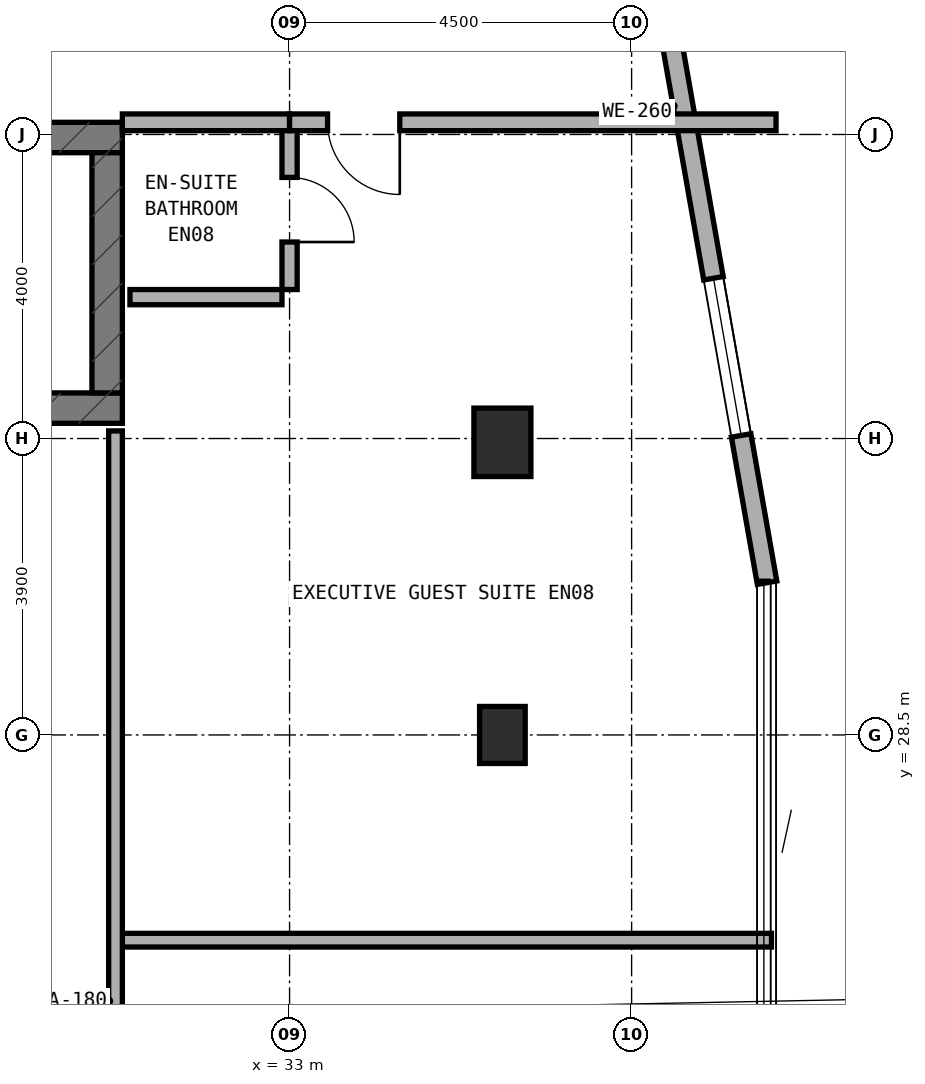
"""IFC4 building model, lengths in metres.
Left out: names, types, materials, properties, quantities, classifications, styles, units other than length and angle.
Written with IfcOpenShell. Run it as: python <this file> out.ifc"""

import sys

from ifc_helpers import new_model, si_unit, direction, frame, frame_2d, origin, origin_2d, place, context, subcontext, project, spatial, rectangle, extrude, element, fill, save


model = new_model("IFC4")
c1 = context("Model", 3, precision=1e-05, world=origin(), true_north=direction((0.0, 1.0)))
c2 = subcontext(c1, "Body", "Model", "MODEL_VIEW")
j1 = project(units=[si_unit("LENGTHUNIT", "METRE"), si_unit("PLANEANGLEUNIT", "RADIAN")], contexts=[c1])
p1 = place(None, origin())
s1 = spatial("IfcSite", under=j1, at=p1, CompositionType="ELEMENT")
p2 = place(p1, origin())
s2 = spatial("IfcBuilding", under=s1, at=p2, CompositionType="ELEMENT")
p3 = place(p2, frame((0.0, 0.0, 243.2)))
s3 = spatial("IfcBuildingStorey", under=s2, at=p3, CompositionType="ELEMENT", Elevation=243.2)
p4 = place(p3, frame((6.4, 32.8, 0.0), z_axis=(0.0, 0.0, 1.0), x_axis=(1.0, 0.0, 0.0)))
e1 = element("IfcWall", 1, at=p4, inside=s3, PredefinedType="SHEAR", context=c2, shape_type="SweptSolid", body=[
    extrude(rectangle(XDim=24.4, YDim=0.4, at=frame_2d((12.2, 0.0))), origin(), (0.0, 0.0, 1.0), 3.6),
])
p5 = place(p4, frame((6.05, 0.0, 0.0)))
e2 = element("IfcOpeningElement", 2, at=p5, cuts=e1, PredefinedType="OPENING", context=c2, shape_type="SweptSolid", body=[
    extrude(rectangle(XDim=1.1, YDim=2.15, at=frame_2d((0.55, 1.075))), frame((0.0, 0.21, 0.0), z_axis=(0.0, -1.0, 0.0), x_axis=(1.0, 0.0, 0.0)), (0.0, 0.0, 1.0), 0.42),
])
p6 = place(p3, frame((6.4, 36.36, 0.0), z_axis=(0.0, 0.0, 1.0), x_axis=(1.0, 0.0, 0.0)))
e3 = element("IfcWall", 3, at=p6, inside=s3, PredefinedType="SHEAR", context=c2, shape_type="SweptSolid", body=[
    extrude(rectangle(XDim=24.4, YDim=0.4, at=frame_2d((12.2, 0.0))), origin(), (0.0, 0.0, 1.0), 3.6),
])
p7 = place(p6, frame((9.15, 0.0, 0.0)))
e4 = element("IfcOpeningElement", 4, at=p7, cuts=e3, PredefinedType="OPENING", context=c2, shape_type="SweptSolid", body=[
    extrude(rectangle(XDim=1.2, YDim=2.15, at=frame_2d((0.6, 1.075))), frame((0.0, 0.21, 0.0), z_axis=(0.0, -1.0, 0.0), x_axis=(1.0, 0.0, 0.0)), (0.0, 0.0, 1.0), 0.42),
])
p8 = place(p6, frame((19.2, 0.0, 0.0)))
e5 = element("IfcOpeningElement", 5, at=p8, cuts=e3, PredefinedType="OPENING", context=c2, shape_type="SweptSolid", body=[
    extrude(rectangle(XDim=0.85, YDim=2.1, at=frame_2d((0.425, 1.05))), frame((0.0, 0.21, 0.0), z_axis=(0.0, -1.0, 0.0), x_axis=(1.0, 0.0, 0.0)), (0.0, 0.0, 1.0), 0.42),
])
p9 = place(p6, frame((16.94, 0.0, 0.0)))
e6 = element("IfcOpeningElement", 6, at=p9, cuts=e3, PredefinedType="OPENING", context=c2, shape_type="SweptSolid", body=[
    extrude(rectangle(XDim=0.85, YDim=2.1, at=frame_2d((0.425, 1.05))), frame((0.0, 0.21, 0.0), z_axis=(0.0, -1.0, 0.0), x_axis=(1.0, 0.0, 0.0)), (0.0, 0.0, 1.0), 0.42),
])
p10 = place(p3, frame((30.6, 33.0, 0.0), z_axis=(0.0, 0.0, 1.0), x_axis=(0.0, 1.0, 0.0)))
e7 = element("IfcWall", 7, at=p10, inside=s3, PredefinedType="SHEAR", context=c2, shape_type="SweptSolid", body=[
    extrude(rectangle(XDim=3.16, YDim=0.4, at=frame_2d((1.58, 0.0))), origin(), (0.0, 0.0, 1.0), 3.6),
])
p11 = place(p3, frame((35.8, 28.5, 0.0), z_axis=(0.0, 0.0, 1.0), x_axis=(1.0, 0.0, 0.0)))
e8 = element("IfcColumn", 8, at=p11, inside=s3, PredefinedType="COLUMN", context=c2, shape_type="SweptSolid", body=[
    extrude(rectangle(XDim=0.6, YDim=0.75, at=origin_2d()), origin(), (0.0, 0.0, 1.0), 3.6),
])
p12 = place(p3, frame((35.8, 32.35, 0.0), z_axis=(0.0, 0.0, 1.0), x_axis=(1.0, 0.0, 0.0)))
e9 = element("IfcColumn", 9, at=p12, inside=s3, PredefinedType="COLUMN", context=c2, shape_type="SweptSolid", body=[
    extrude(rectangle(XDim=0.75, YDim=0.9, at=origin_2d()), origin(), (0.0, 0.0, 1.0), 3.6),
])
p13 = place(p3, frame((39.282, 30.503, 0.0), z_axis=(0.0, 0.0, 1.0), x_axis=(-0.173396937698, 0.984852020355, 0.0)))
e10 = element("IfcWall", 10, at=p13, inside=s3, PredefinedType="STANDARD", context=c2, shape_type="SweptSolid", body=[
    extrude(rectangle(XDim=8.714, YDim=0.26, at=frame_2d((4.357, 0.0))), origin(), (0.0, 0.0, 1.0), 3.32),
])
p14 = place(p13, frame((1.967, 0.0, 0.85)))
e11 = element("IfcOpeningElement", 11, at=p14, cuts=e10, PredefinedType="OPENING", context=c2, shape_type="SweptSolid", body=[
    extrude(rectangle(XDim=2.1, YDim=1.5, at=frame_2d((1.05, 0.75))), frame((0.0, 0.14, 0.0), z_axis=(0.0, -1.0, 0.0), x_axis=(1.0, 0.0, 0.0)), (0.0, 0.0, 1.0), 0.28),
])
p15 = place(p3, frame((30.8, 25.8, 0.0), z_axis=(0.0, 0.0, 1.0), x_axis=(1.0, 0.0, 0.0)))
e12 = element("IfcWall", 12, at=p15, inside=s3, PredefinedType="SOLIDWALL", context=c2, shape_type="SweptSolid", body=[
    extrude(rectangle(XDim=8.54, YDim=0.18, at=frame_2d((4.27, 0.0))), origin(), (0.0, 0.0, 1.0), 3.015),
])
p16 = place(p3, frame((30.71, 17.5, 0.0), z_axis=(0.0, 0.0, 1.0), x_axis=(0.0, 1.0, 0.0)))
e13 = element("IfcWall", 13, at=p16, inside=s3, PredefinedType="SOLIDWALL", context=c2, shape_type="SweptSolid", body=[
    extrude(rectangle(XDim=15.0, YDim=0.18, at=frame_2d((7.5, 0.0))), origin(), (0.0, 0.0, 1.0), 2.745),
])
p17 = place(p3, frame((33.0, 34.36, 0.0), z_axis=(0.0, 0.0, 1.0), x_axis=(0.0, 1.0, 0.0)))
e14 = element("IfcWall", 14, at=p17, inside=s3, PredefinedType="PLUMBINGWALL", context=c2, shape_type="SweptSolid", body=[
    extrude(rectangle(XDim=2.1, YDim=0.2, at=frame_2d((1.05, 0.0))), origin(), (0.0, 0.0, 1.0), 3.32),
])
p18 = place(p17, frame((0.625, 0.0, 0.0)))
e15 = element("IfcOpeningElement", 15, at=p18, cuts=e14, PredefinedType="OPENING", context=c2, shape_type="SweptSolid", body=[
    extrude(rectangle(XDim=0.85, YDim=2.1, at=frame_2d((0.425, 1.05))), frame((0.0, 0.11, 0.0), z_axis=(0.0, -1.0, 0.0), x_axis=(1.0, 0.0, 0.0)), (0.0, 0.0, 1.0), 0.22),
])
p19 = place(p3, frame((30.9, 34.26, 0.0), z_axis=(0.0, 0.0, 1.0), x_axis=(1.0, 0.0, 0.0)))
e16 = element("IfcWall", 16, at=p19, inside=s3, PredefinedType="PLUMBINGWALL", context=c2, shape_type="SweptSolid", body=[
    extrude(rectangle(XDim=2.0, YDim=0.2, at=frame_2d((1.0, 0.0))), origin(), (0.0, 0.0, 1.0), 3.32),
])
p20 = place(p3, frame((30.8, 36.56, 0.0), z_axis=(0.0, 0.0, 1.0), x_axis=(1.0, 0.0, 0.0)))
e17 = element("IfcWall", 17, at=p20, inside=s3, PredefinedType="SOLIDWALL", context=c2, shape_type="SweptSolid", body=[
    extrude(rectangle(XDim=2.2, YDim=0.22, at=frame_2d((1.1, 0.0))), origin(), (0.0, 0.0, 1.0), 3.32),
])
p21 = place(p3, frame((33.0, 36.56, 0.0), z_axis=(0.0, 0.0, 1.0), x_axis=(1.0, 0.0, 0.0)))
e18 = element("IfcWall", 18, at=p21, inside=s3, PredefinedType="SOLIDWALL", context=c2, shape_type="SweptSolid", body=[
    extrude(rectangle(XDim=6.4, YDim=0.22, at=frame_2d((3.2, 0.0))), origin(), (0.0, 0.0, 1.0), 2.745),
])
p22 = place(p21, frame((0.5, 0.0, 0.0)))
e19 = element("IfcOpeningElement", 19, at=p22, cuts=e18, PredefinedType="OPENING", context=c2, shape_type="SweptSolid", body=[
    extrude(rectangle(XDim=0.95, YDim=2.1, at=frame_2d((0.475, 1.05))), frame((0.0, 0.12, 0.0), z_axis=(0.0, -1.0, 0.0), x_axis=(1.0, 0.0, 0.0)), (0.0, 0.0, 1.0), 0.24),
])
p23 = place(p14, origin())
e20 = element("IfcWindow", 20, at=p23, inside=s3, PartitioningType="SINGLE_PANEL", PredefinedType="WINDOW", context=c2, shape_type="SweptSolid", body=[
    extrude(rectangle(XDim=2.1, YDim=1.5, at=frame_2d((1.05, 0.75))), frame((0.0, 0.03, 0.0), z_axis=(0.0, -1.0, 0.0), x_axis=(1.0, 0.0, 0.0)), (0.0, 0.0, 1.0), 0.06),
])
fill(e11, e20)
p24 = place(p18, frame((0.85, 0.0, 0.0), z_axis=(0.0, 0.0, 1.0), x_axis=(-1.0, 0.0, 0.0)))
e21 = element("IfcDoor", 21, at=p24, inside=s3, OperationType="SINGLE_SWING_RIGHT", PredefinedType="DOOR", context=c2, shape_type="SweptSolid", body=[
    extrude(rectangle(XDim=0.85, YDim=2.1, at=frame_2d((0.425, 1.05))), frame((0.0, 0.025, 0.0), z_axis=(0.0, -1.0, 0.0), x_axis=(1.0, 0.0, 0.0)), (0.0, 0.0, 1.0), 0.05),
])
fill(e15, e21)
p25 = place(p22, frame((0.95, 0.0, 0.0), z_axis=(0.0, 0.0, 1.0), x_axis=(-1.0, 0.0, 0.0)))
e22 = element("IfcDoor", 22, at=p25, inside=s3, OperationType="SINGLE_SWING_LEFT", PredefinedType="DOOR", context=c2, shape_type="SweptSolid", body=[
    extrude(rectangle(XDim=0.95, YDim=2.1, at=frame_2d((0.475, 1.05))), frame((0.0, 0.025, 0.0), z_axis=(0.0, -1.0, 0.0), x_axis=(1.0, 0.0, 0.0)), (0.0, 0.0, 1.0), 0.05),
])
fill(e19, e22)
save(model, sys.argv[1])
